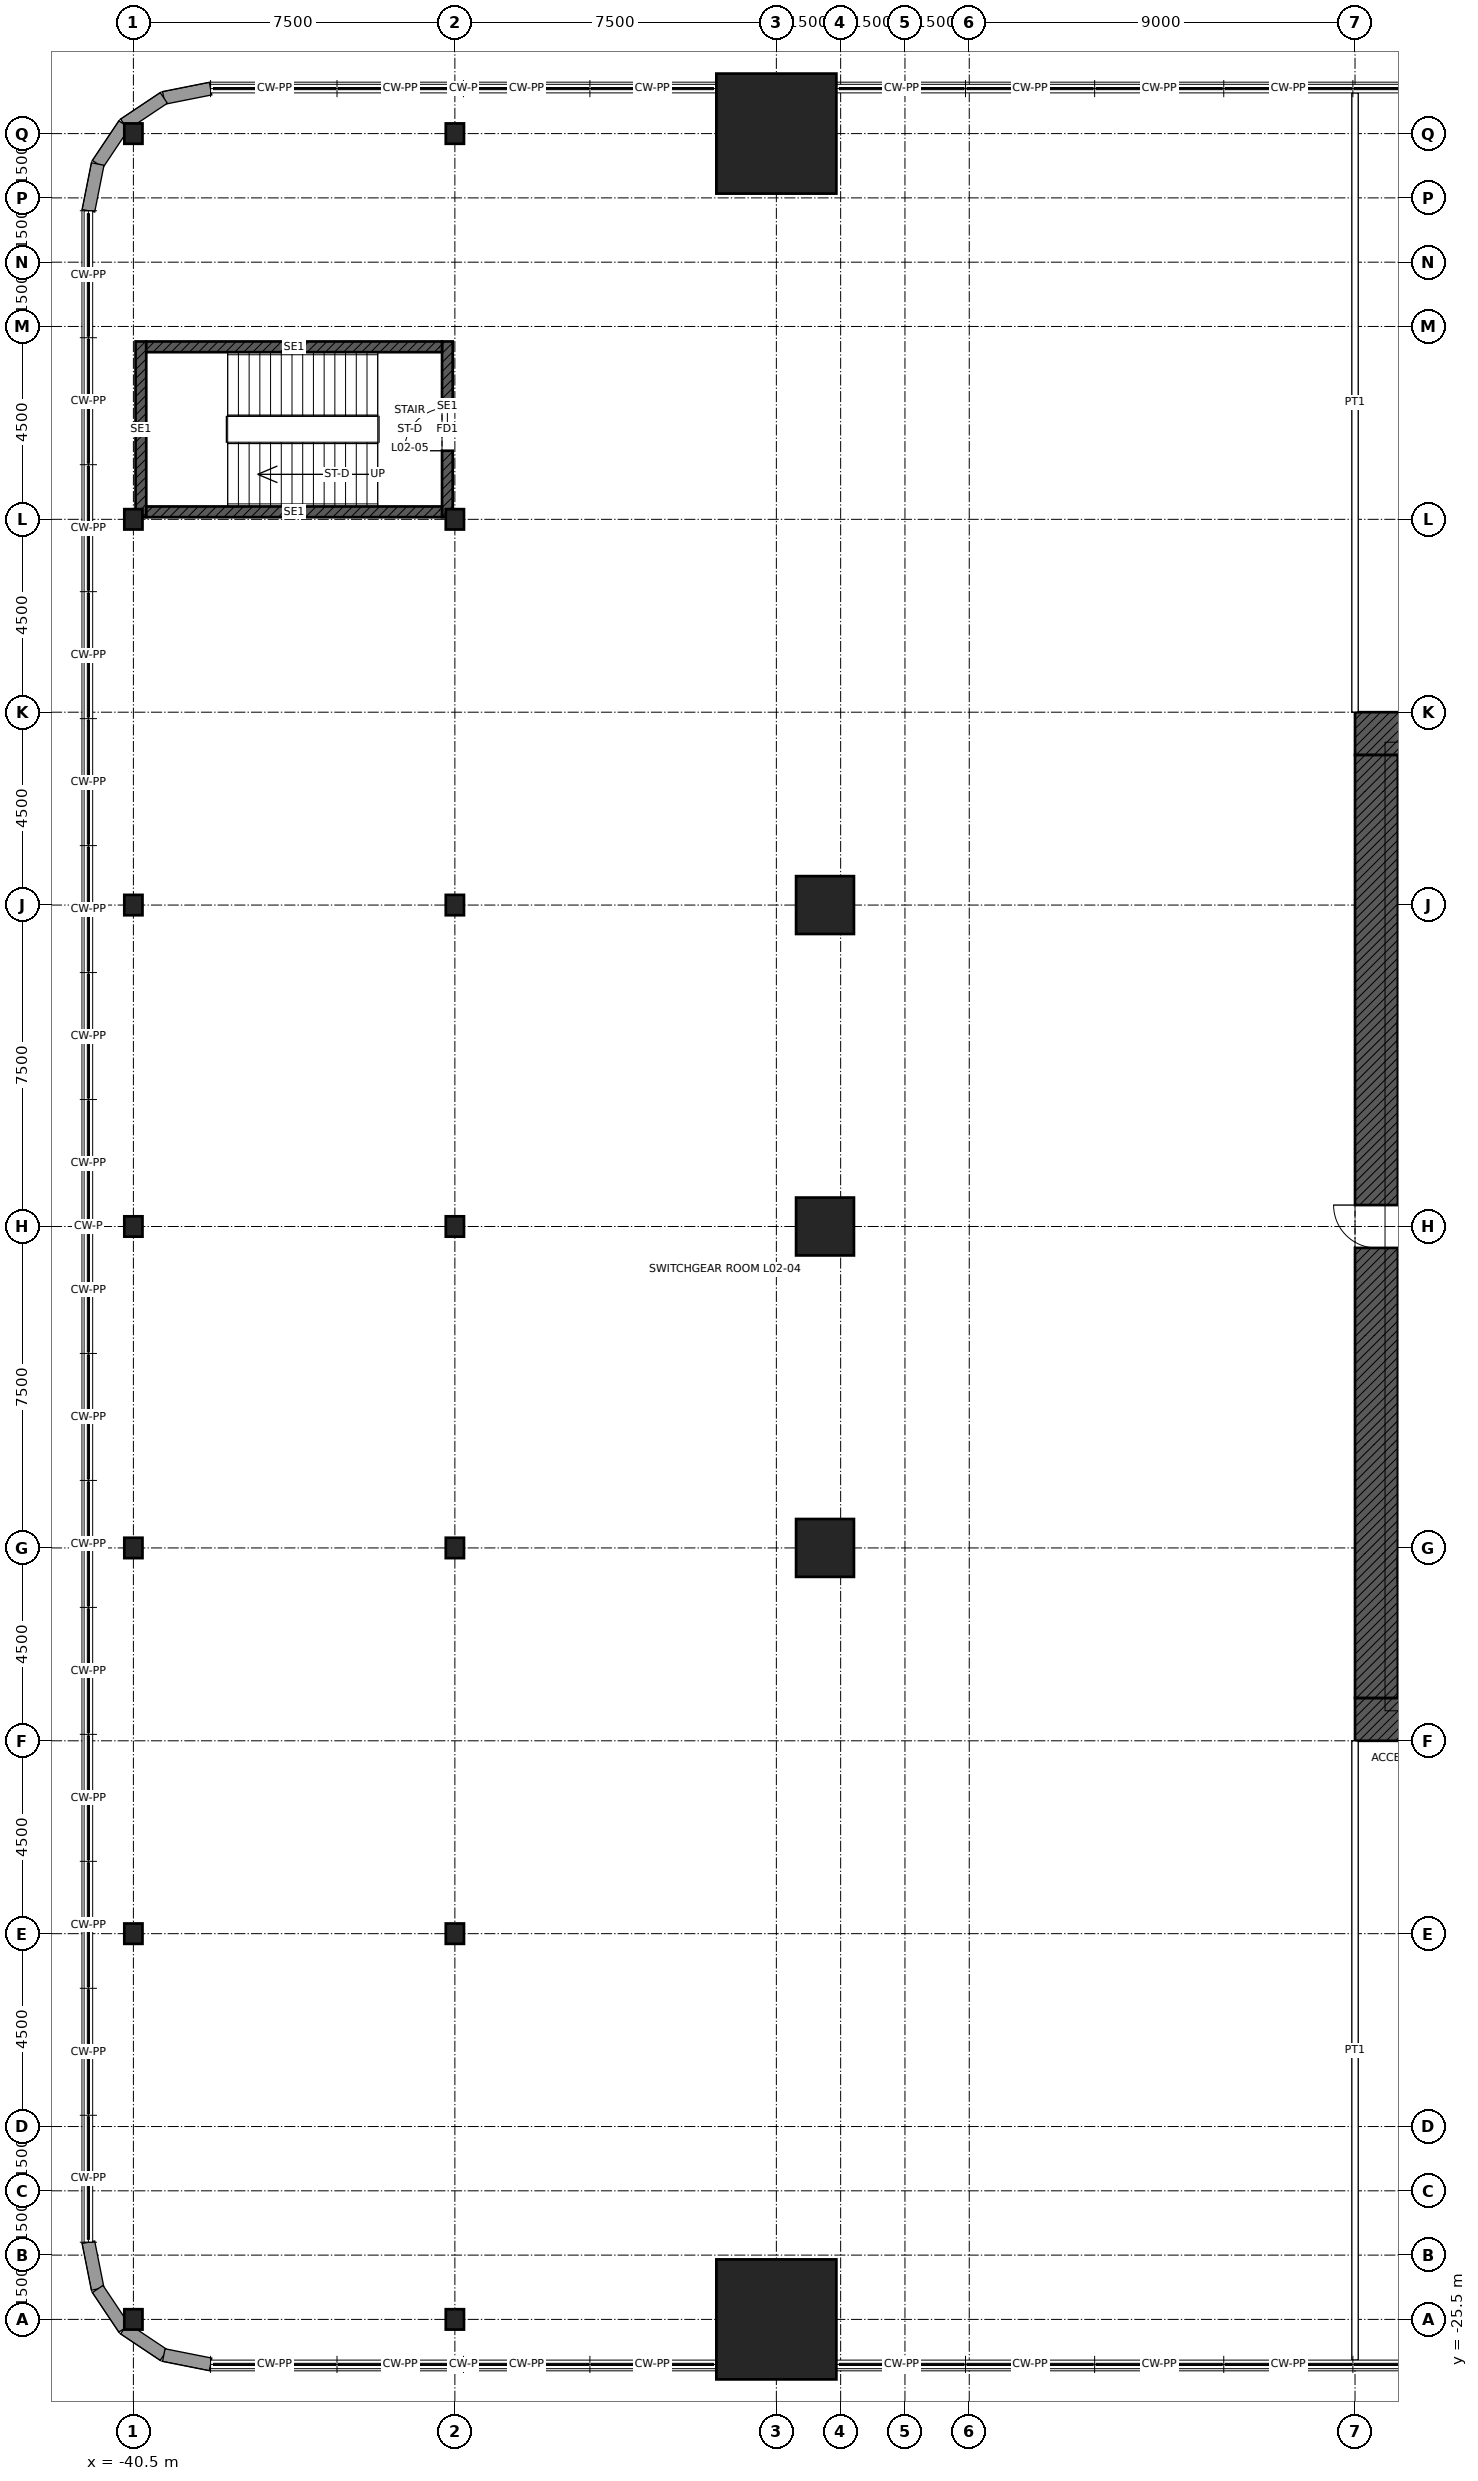
"""IFC4 building model, lengths in metres.
Left out: names, types, materials, properties, quantities, classifications, styles, units other than length and angle.
Written with IfcOpenShell. Run it as: python <this file> out.ifc"""

import sys

from ifc_helpers import new_model, si_unit, direction, frame, frame_2d, origin, origin_2d, place, context, subcontext, project, spatial, rectangle, hollow_rectangle, i_section, extrude, element, fill, save


model = new_model("IFC4")
c1 = context("Model", 3, precision=1e-05, world=origin(), true_north=direction((0.0, 1.0)))
c2 = subcontext(c1, "Body", "Model", "MODEL_VIEW")
j1 = project(units=[si_unit("LENGTHUNIT", "METRE"), si_unit("PLANEANGLEUNIT", "RADIAN")], contexts=[c1])
p1 = place(None, origin())
s1 = spatial("IfcSite", under=j1, at=p1, CompositionType="ELEMENT")
p2 = place(p1, origin())
s2 = spatial("IfcBuilding", under=s1, at=p2, CompositionType="ELEMENT")
p3 = place(p2, frame((0.0, 0.0, 12.6)))
s3 = spatial("IfcBuildingStorey", under=s2, at=p3, CompositionType="ELEMENT", Elevation=12.6)
for number, where, z_axis, x_axis in (
    (1, (-25.5, -25.5, 0.0), (0.0, 0.0, 1.0), (1.0, 0.0, 0.0)),
    (2, (-25.5, 25.5, 0.0), (0.0, 0.0, 1.0), (1.0, 0.0, 0.0)),
):
    element("IfcColumn", number, at=place(p3, frame(where, z_axis=z_axis, x_axis=x_axis)), inside=s3, PredefinedType="COLUMN", context=c2, shape_type="SweptSolid", body=[
        extrude(hollow_rectangle(XDim=2.8, YDim=2.8, WallThickness=0.14, at=origin_2d()), origin(), (0.0, 0.0, 1.0), 5.4),
    ])
for number, where, z_axis, x_axis in (
    (3, (-24.365, -7.5, 0.0), (0.0, 0.0, 1.0), (1.0, 0.0, 0.0)),
    (4, (-24.365, 0.0, 0.0), (0.0, 0.0, 1.0), (1.0, 0.0, 0.0)),
    (5, (-24.365, 7.5, 0.0), (0.0, 0.0, 1.0), (1.0, 0.0, 0.0)),
):
    element("IfcColumn", number, at=place(p3, frame(where, z_axis=z_axis, x_axis=x_axis)), inside=s3, PredefinedType="COLUMN", context=c2, shape_type="SweptSolid", body=[
        extrude(hollow_rectangle(XDim=1.35, YDim=1.35, WallThickness=0.1, at=origin_2d()), origin(), (0.0, 0.0, 1.0), 5.4),
    ])
for number, where, z_axis, x_axis in (
    (6, (-33.0, -25.5, 0.0), (0.0, 0.0, 1.0), (1.0, 0.0, 0.0)),
    (7, (-33.0, -16.5, 0.0), (0.0, 0.0, 1.0), (1.0, 0.0, 0.0)),
    (8, (-33.0, -7.5, 0.0), (0.0, 0.0, 1.0), (1.0, 0.0, 0.0)),
    (9, (-33.0, 0.0, 0.0), (0.0, 0.0, 1.0), (1.0, 0.0, 0.0)),
    (10, (-33.0, 7.5, 0.0), (0.0, 0.0, 1.0), (1.0, 0.0, 0.0)),
    (11, (-33.0, 16.5, 0.0), (0.0, 0.0, 1.0), (1.0, 0.0, 0.0)),
    (12, (-33.0, 25.5, 0.0), (0.0, 0.0, 1.0), (1.0, 0.0, 0.0)),
    (13, (-40.5, -25.5, 0.0), (0.0, 0.0, 1.0), (1.0, 0.0, 0.0)),
    (14, (-40.5, -16.5, 0.0), (0.0, 0.0, 1.0), (1.0, 0.0, 0.0)),
    (15, (-40.5, -7.5, 0.0), (0.0, 0.0, 1.0), (1.0, 0.0, 0.0)),
    (16, (-40.5, 0.0, 0.0), (0.0, 0.0, 1.0), (1.0, 0.0, 0.0)),
    (17, (-40.5, 7.5, 0.0), (0.0, 0.0, 1.0), (1.0, 0.0, 0.0)),
    (18, (-40.5, 16.5, 0.0), (0.0, 0.0, 1.0), (1.0, 0.0, 0.0)),
    (19, (-40.5, 25.5, 0.0), (0.0, 0.0, 1.0), (1.0, 0.0, 0.0)),
):
    element("IfcColumn", number, at=place(p3, frame(where, z_axis=z_axis, x_axis=x_axis)), inside=s3, PredefinedType="COLUMN", context=c2, shape_type="SweptSolid", body=[
        extrude(i_section(OverallWidth=0.424, OverallDepth=0.475, WebThickness=0.048, FlangeThickness=0.077, at=origin_2d()), origin(), (0.0, 0.0, 1.0), 5.4),
    ])
p4 = place(p3, frame((-12.0, 11.5, 0.0), z_axis=(0.0, 0.0, 1.0), x_axis=(1.0, 0.0, 0.0)))
e20 = element("IfcWall", 20, at=p4, inside=s3, PredefinedType="SHEAR", context=c2, shape_type="SweptSolid", body=[
    extrude(rectangle(XDim=24.0, YDim=1.0, at=frame_2d((12.0, 0.0))), origin(), (0.0, 0.0, 1.0), 5.4),
])
p5 = place(p4, frame((6.25, 0.0, 0.0)))
e21 = element("IfcOpeningElement", 21, at=p5, cuts=e20, PredefinedType="OPENING", context=c2, shape_type="SweptSolid", body=[
    extrude(rectangle(XDim=1.0, YDim=2.4, at=frame_2d((0.5, 1.2))), frame((0.0, 0.51, 0.0), z_axis=(0.0, -1.0, 0.0), x_axis=(1.0, 0.0, 0.0)), (0.0, 0.0, 1.0), 1.02),
])
p6 = place(p4, frame((16.75, 0.0, 0.0)))
e22 = element("IfcOpeningElement", 22, at=p6, cuts=e20, PredefinedType="OPENING", context=c2, shape_type="SweptSolid", body=[
    extrude(rectangle(XDim=1.0, YDim=2.4, at=frame_2d((0.5, 1.2))), frame((0.0, 0.51, 0.0), z_axis=(0.0, -1.0, 0.0), x_axis=(1.0, 0.0, 0.0)), (0.0, 0.0, 1.0), 1.02),
])
p7 = place(p3, frame((12.0, -11.5, 0.0), z_axis=(0.0, 0.0, 1.0), x_axis=(-1.0, 0.0, 0.0)))
e23 = element("IfcWall", 23, at=p7, inside=s3, PredefinedType="SHEAR", context=c2, shape_type="SweptSolid", body=[
    extrude(rectangle(XDim=24.0, YDim=1.0, at=frame_2d((12.0, 0.0))), origin(), (0.0, 0.0, 1.0), 5.4),
])
p8 = place(p7, frame((11.5, 0.0, 0.0)))
e24 = element("IfcOpeningElement", 24, at=p8, cuts=e23, PredefinedType="OPENING", context=c2, shape_type="SweptSolid", body=[
    extrude(rectangle(XDim=1.0, YDim=2.1, at=frame_2d((0.5, 1.05))), frame((0.0, 0.51, 0.0), z_axis=(0.0, -1.0, 0.0), x_axis=(1.0, 0.0, 0.0)), (0.0, 0.0, 1.0), 1.02),
])
p9 = place(p7, frame((1.0, 0.0, 0.0)))
e25 = element("IfcOpeningElement", 25, at=p9, cuts=e23, PredefinedType="OPENING", context=c2, shape_type="SweptSolid", body=[
    extrude(rectangle(XDim=1.0, YDim=2.4, at=frame_2d((0.5, 1.2))), frame((0.0, 0.51, 0.0), z_axis=(0.0, -1.0, 0.0), x_axis=(1.0, 0.0, 0.0)), (0.0, 0.0, 1.0), 1.02),
])
p10 = place(p3, frame((-11.5, -11.0, 0.0), z_axis=(0.0, 0.0, 1.0), x_axis=(0.0, 1.0, 0.0)))
e26 = element("IfcWall", 26, at=p10, inside=s3, PredefinedType="SHEAR", context=c2, shape_type="SweptSolid", body=[
    extrude(rectangle(XDim=22.0, YDim=1.0, at=frame_2d((11.0, 0.0))), origin(), (0.0, 0.0, 1.0), 5.4),
])
p11 = place(p10, frame((10.5, 0.0, 0.0)))
e27 = element("IfcOpeningElement", 27, at=p11, cuts=e26, PredefinedType="OPENING", context=c2, shape_type="SweptSolid", body=[
    extrude(rectangle(XDim=1.0, YDim=2.4, at=frame_2d((0.5, 1.2))), frame((0.0, 0.51, 0.0), z_axis=(0.0, -1.0, 0.0), x_axis=(1.0, 0.0, 0.0)), (0.0, 0.0, 1.0), 1.02),
])
for number, where, z_axis, x_axis in (
    (28, (-38.7, 26.55, 0.0), (0.0, 0.0, 1.0), (-0.981, -0.195, 0.0)),
    (29, (-39.791, 26.333, 0.0), (0.0, 0.0, 1.0), (-0.832, -0.555, 0.0)),
    (30, (-40.715, 25.715, 0.0), (0.0, 0.0, 1.0), (-0.555, -0.832, 0.0)),
    (31, (-41.333, 24.791, 0.0), (0.0, 0.0, 1.0), (-0.195, -0.981, 0.0)),
    (32, (-41.55, -23.7, 0.0), (0.0, 0.0, 1.0), (0.195, -0.981, 0.0)),
    (33, (-41.333, -24.791, 0.0), (0.0, 0.0, 1.0), (0.555, -0.832, 0.0)),
    (34, (-40.715, -25.715, 0.0), (0.0, 0.0, 1.0), (0.832, -0.555, 0.0)),
    (35, (-39.791, -26.333, 0.0), (0.0, 0.0, 1.0), (0.981, -0.195, 0.0)),
):
    element("IfcWall", number, at=place(p3, frame(where, z_axis=z_axis, x_axis=x_axis)), inside=s3, PredefinedType="SOLIDWALL", context=c2, shape_type="SweptSolid", body=[
        extrude(rectangle(XDim=1.112, YDim=0.3, at=frame_2d((0.556, 0.0))), origin(), (0.0, 0.0, 1.0), 5.15),
    ])
p12 = place(p3, frame((-12.0, 12.0, 0.0), z_axis=(0.0, 0.0, 1.0), x_axis=(0.0, 1.0, 0.0)))
e36 = element("IfcWall", 36, at=p12, inside=s3, PredefinedType="PARTITIONING", context=c2, shape_type="SweptSolid", body=[
    extrude(rectangle(XDim=14.45, YDim=0.15, at=frame_2d((7.225, 0.0))), origin(), (0.0, 0.0, 1.0), 4.108),
])
p13 = place(p3, frame((-12.0, -12.0, 0.0), z_axis=(0.0, 0.0, 1.0), x_axis=(0.0, -1.0, 0.0)))
e37 = element("IfcWall", 37, at=p13, inside=s3, PredefinedType="PARTITIONING", context=c2, shape_type="SweptSolid", body=[
    extrude(rectangle(XDim=14.45, YDim=0.15, at=frame_2d((7.225, 0.0))), origin(), (0.0, 0.0, 1.0), 5.15),
])
p14 = place(p3, frame((-40.325, 16.55, 0.0), z_axis=(0.0, 0.0, 1.0), x_axis=(0.0, 1.0, 0.0)))
e38 = element("IfcWall", 38, at=p14, inside=s3, PredefinedType="SOLIDWALL", context=c2, shape_type="SweptSolid", body=[
    extrude(rectangle(XDim=4.1, YDim=0.25, at=frame_2d((2.05, 0.0))), origin(), (0.0, 0.0, 1.0), 5.15),
])
p15 = place(p3, frame((-33.175, 16.55, 0.0), z_axis=(0.0, 0.0, 1.0), x_axis=(0.0, 1.0, 0.0)))
e39 = element("IfcWall", 39, at=p15, inside=s3, PredefinedType="SOLIDWALL", context=c2, shape_type="SweptSolid", body=[
    extrude(rectangle(XDim=4.1, YDim=0.25, at=frame_2d((2.05, 0.0))), origin(), (0.0, 0.0, 1.0), 5.15),
])
p16 = place(p15, frame((1.55, 0.0, 0.0)))
e40 = element("IfcOpeningElement", 40, at=p16, cuts=e39, PredefinedType="OPENING", context=c2, shape_type="SweptSolid", body=[
    extrude(rectangle(XDim=1.0, YDim=2.1, at=frame_2d((0.5, 1.05))), frame((0.0, 0.135, 0.0), z_axis=(0.0, -1.0, 0.0), x_axis=(1.0, 0.0, 0.0)), (0.0, 0.0, 1.0), 0.27),
])
for number, where, z_axis, x_axis in (
    (41, (-40.2, 16.675, 0.0), (0.0, 0.0, 1.0), (1.0, 0.0, 0.0)),
    (42, (-40.2, 20.525, 0.0), (0.0, 0.0, 1.0), (1.0, 0.0, 0.0)),
):
    element("IfcWall", number, at=place(p3, frame(where, z_axis=z_axis, x_axis=x_axis)), inside=s3, PredefinedType="SOLIDWALL", context=c2, shape_type="SweptSolid", body=[
        extrude(rectangle(XDim=6.9, YDim=0.25, at=frame_2d((3.45, 0.0))), origin(), (0.0, 0.0, 1.0), 5.15),
    ])
p17 = place(p11, origin())
e43 = element("IfcDoor", 43, at=p17, inside=s3, OperationType="SINGLE_SWING_RIGHT", PredefinedType="DOOR", context=c2, shape_type="SweptSolid", body=[
    extrude(rectangle(XDim=1.0, YDim=2.4, at=frame_2d((0.5, 1.2))), frame((0.0, 0.485, 0.0), z_axis=(0.0, -1.0, 0.0), x_axis=(1.0, 0.0, 0.0)), (0.0, 0.0, 1.0), 0.05),
])
fill(e27, e43)
p18 = place(p16, origin())
e44 = element("IfcDoor", 44, at=p18, inside=s3, OperationType="SINGLE_SWING_LEFT", PredefinedType="DOOR", context=c2, shape_type="SweptSolid", body=[
    extrude(rectangle(XDim=1.0, YDim=2.1, at=frame_2d((0.5, 1.05))), frame((0.0, 0.025, 0.0), z_axis=(0.0, -1.0, 0.0), x_axis=(1.0, 0.0, 0.0)), (0.0, 0.0, 1.0), 0.05),
])
fill(e40, e44)
save(model, sys.argv[1])
